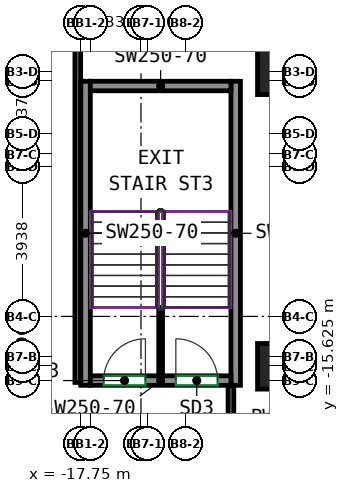
"""IFC4 building model, lengths in metres.
Left out: names, types, materials, properties, quantities, classifications, styles, units other than length and angle.
Written with IfcOpenShell. Run it as: python <this file> out.ifc"""

import sys

from ifc_helpers import new_model, si_unit, direction, frame, frame_2d, origin, origin_2d, place, context, subcontext, project, spatial, rectangle, extrude, source, transform, mapped, element, fill, save


model = new_model("IFC4")
c1 = context("Model", 3, precision=1e-05, world=origin(), true_north=direction((0.0, 1.0)))
c2 = subcontext(c1, "Body", "Model", "MODEL_VIEW")
j1 = project(units=[si_unit("LENGTHUNIT", "METRE"), si_unit("PLANEANGLEUNIT", "RADIAN")], contexts=[c1])
p1 = place(None, origin())
s1 = spatial("IfcSite", under=j1, at=p1, CompositionType="ELEMENT")
p2 = place(p1, origin())
s2 = spatial("IfcBuilding", under=s1, at=p2, CompositionType="ELEMENT")
p3 = place(p2, frame((0.0, 0.0, 128.6)))
s3 = spatial("IfcBuildingStorey", under=s2, at=p3, CompositionType="ELEMENT", Elevation=128.6)
m1 = source(origin(), c2, "Body", "SweptSolid", [
    extrude(rectangle(XDim=1.2, YDim=1.2, at=origin_2d()), origin(), (0.0, 0.0, 1.0), 5.5),
])
p4 = place(p3, frame((-12.5, -15.25, 0.0), z_axis=(0.0, 0.0, 1.0), x_axis=(1.0, 0.0, 0.0)))
e1 = element("IfcColumn", 1, at=p4, inside=s3, PredefinedType="COLUMN", context=c2, shape_type="MappedRepresentation", body=[
    mapped(m1, transform((0.0, 0.0, 0.0))),
])
m2 = source(origin(), c2, "Body", "SweptSolid", [
    extrude(rectangle(XDim=1.2, YDim=1.2, at=origin_2d()), origin(), (0.0, 0.0, 1.0), 9.5),
])
p5 = place(p3, frame((-12.5, -7.5, 0.0), z_axis=(0.0, 0.0, 1.0), x_axis=(1.0, 0.0, 0.0)))
e2 = element("IfcColumn", 2, at=p5, inside=s3, PredefinedType="COLUMN", context=c2, shape_type="MappedRepresentation", body=[
    mapped(m2, transform((0.0, 0.0, 0.0))),
])
m3 = source(origin(), c2, "Body", "SweptSolid", [
    extrude(rectangle(XDim=8.0, YDim=0.25, at=frame_2d((4.0, 0.0))), origin(), (0.0, 0.0, 1.0), 9.5),
])
for number, where, z_axis, x_axis in (
    (3, (-17.625, -15.75, 0.0), (0.0, 0.0, 1.0), (0.0, 1.0, 0.0)),
    (4, (-13.675, -15.75, 0.0), (0.0, 0.0, 1.0), (0.0, 1.0, 0.0)),
):
    element("IfcWall", number, at=place(p3, frame(where, z_axis=z_axis, x_axis=x_axis)), inside=s3, PredefinedType="SHEAR", context=c2, shape_type="MappedRepresentation", body=[
        mapped(m3, transform((0.0, 0.0, 0.0))),
    ])
m4 = source(origin(), c2, "Body", "SweptSolid", [
    extrude(rectangle(XDim=3.7, YDim=0.25, at=frame_2d((1.85, 0.0))), origin(), (0.0, 0.0, 1.0), 9.5),
])
p6 = place(p3, frame((-17.5, -15.625, 0.0), z_axis=(0.0, 0.0, 1.0), x_axis=(1.0, 0.0, 0.0)))
e5 = element("IfcWall", 5, at=p6, inside=s3, PredefinedType="SHEAR", context=c2, shape_type="MappedRepresentation", body=[
    mapped(m4, transform((0.0, 0.0, 0.0))),
])
p7 = place(p6, frame((0.35, 0.0, 0.0)))
e6 = element("IfcOpeningElement", 6, at=p7, cuts=e5, PredefinedType="OPENING", context=c2, shape_type="SweptSolid", body=[
    extrude(rectangle(XDim=1.1, YDim=2.1, at=frame_2d((0.55, 1.05))), frame((0.0, 0.135, 0.0), z_axis=(0.0, -1.0, 0.0), x_axis=(1.0, 0.0, 0.0)), (0.0, 0.0, 1.0), 0.27),
])
p8 = place(p6, frame((2.25, 0.0, 0.0)))
e7 = element("IfcOpeningElement", 7, at=p8, cuts=e5, PredefinedType="OPENING", context=c2, shape_type="SweptSolid", body=[
    extrude(rectangle(XDim=1.1, YDim=2.1, at=frame_2d((0.55, 1.05))), frame((0.0, 0.135, 0.0), z_axis=(0.0, -1.0, 0.0), x_axis=(1.0, 0.0, 0.0)), (0.0, 0.0, 1.0), 0.27),
])
p9 = place(p3, frame((-17.5, -7.875, 0.0), z_axis=(0.0, 0.0, 1.0), x_axis=(1.0, 0.0, 0.0)))
e8 = element("IfcWall", 8, at=p9, inside=s3, PredefinedType="SHEAR", context=c2, shape_type="MappedRepresentation", body=[
    mapped(m4, transform((0.0, 0.0, 0.0))),
])
m5 = source(origin(), c2, "Body", "SweptSolid", [
    extrude(rectangle(XDim=1.8, YDim=0.1, at=frame_2d((0.9, 0.0))), origin(), (0.0, 0.0, 1.0), 3.1),
])
p10 = place(p3, frame((-15.65, -15.5, 0.0), z_axis=(0.0, 0.0, 1.0), x_axis=(0.0, 1.0, 0.0)))
e9 = element("IfcWall", 9, at=p10, inside=s3, PredefinedType="PARTITIONING", context=c2, shape_type="MappedRepresentation", body=[
    mapped(m5, transform((0.0, 0.0, 0.0))),
])
p11 = place(p3, frame((-17.83, -15.675, 0.0), z_axis=(0.0, 0.0, 1.0), x_axis=(0.0, 1.0, 0.0)))
e10 = element("IfcWall", 10, at=p11, inside=s3, PredefinedType="PARTITIONING", context=c2, shape_type="SweptSolid", body=[
    extrude(rectangle(XDim=18.95, YDim=0.15, at=frame_2d((9.475, 0.0))), origin(), (0.0, 0.0, 1.0), 9.5),
])
p12 = place(p3, frame((-13.8, -17.475, 0.0), z_axis=(0.0, 0.0, 1.0), x_axis=(0.0, 1.0, 0.0)))
e11 = element("IfcWall", 11, at=p12, inside=s3, PredefinedType="PARTITIONING", context=c2, shape_type="SweptSolid", body=[
    extrude(rectangle(XDim=1.725, YDim=0.15, at=frame_2d((0.863, 0.0))), origin(), (0.0, 0.0, 1.0), 9.5),
])
p13 = place(p7, origin())
e12 = element("IfcDoor", 12, at=p13, inside=s3, OperationType="SINGLE_SWING_RIGHT", PredefinedType="DOOR", context=c2, shape_type="SweptSolid", body=[
    extrude(rectangle(XDim=1.1, YDim=2.1, at=frame_2d((0.55, 1.05))), frame((0.0, 0.025, 0.0), z_axis=(0.0, -1.0, 0.0), x_axis=(1.0, 0.0, 0.0)), (0.0, 0.0, 1.0), 0.05),
])
fill(e6, e12)
p14 = place(p8, origin())
e13 = element("IfcDoor", 13, at=p14, inside=s3, OperationType="SINGLE_SWING_LEFT", PredefinedType="DOOR", context=c2, shape_type="SweptSolid", body=[
    extrude(rectangle(XDim=1.1, YDim=2.1, at=frame_2d((0.55, 1.05))), frame((0.0, 0.025, 0.0), z_axis=(0.0, -1.0, 0.0), x_axis=(1.0, 0.0, 0.0)), (0.0, 0.0, 1.0), 0.05),
])
fill(e7, e13)
save(model, sys.argv[1])
